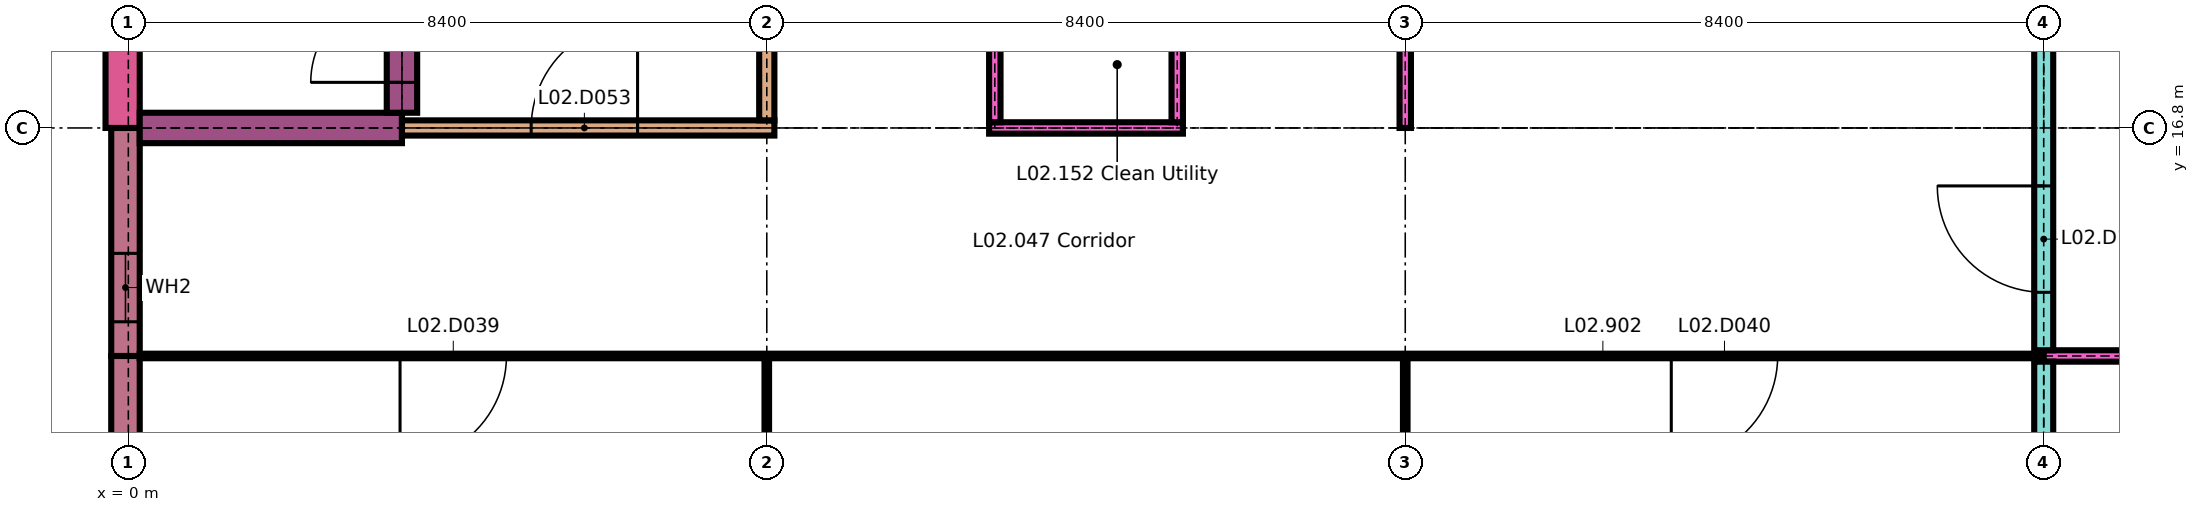
"""IFC4 building model, lengths in metres.
Left out: names, types, materials, properties, quantities, classifications, styles, units other than length and angle.
Written with IfcOpenShell. Run it as: python <this file> out.ifc"""

import sys

from ifc_helpers import new_model, si_unit, direction, frame, frame_2d, origin, place, context, subcontext, project, spatial, rectangle, extrude, element, fill, save


model = new_model("IFC4")
c1 = context("Model", 3, precision=1e-05, world=origin(), true_north=direction((0.0, 1.0)))
c2 = subcontext(c1, "Body", "Model", "MODEL_VIEW")
j1 = project(units=[si_unit("LENGTHUNIT", "METRE"), si_unit("PLANEANGLEUNIT", "RADIAN")], contexts=[c1])
p1 = place(None, origin())
s1 = spatial("IfcSite", under=j1, at=p1, CompositionType="ELEMENT")
p2 = place(p1, origin())
s2 = spatial("IfcBuilding", under=s1, at=p2, CompositionType="ELEMENT")
p3 = place(p2, frame((0.0, 0.0, 8.4)))
s3 = spatial("IfcBuildingStorey", under=s2, at=p3, CompositionType="ELEMENT", Elevation=8.4)
p4 = place(p3, frame((-0.038, 8.825, 0.0), z_axis=(0.0, 0.0, 1.0), x_axis=(0.0, 1.0, 0.0)))
e1 = element("IfcWall", 1, at=p4, inside=s3, PredefinedType="SOLIDWALL", context=c2, shape_type="SweptSolid", body=[
    extrude(rectangle(XDim=4.975, YDim=0.375, at=frame_2d((2.488, 0.0))), origin(), (0.0, 0.0, 1.0), 3.9),
])
p5 = place(p3, frame((-0.038, 13.8, 0.0), z_axis=(0.0, 0.0, 1.0), x_axis=(0.0, 1.0, 0.0)))
e2 = element("IfcWall", 2, at=p5, inside=s3, PredefinedType="SOLIDWALL", context=c2, shape_type="SweptSolid", body=[
    extrude(rectangle(XDim=3.0, YDim=0.375, at=frame_2d((1.5, 0.0))), origin(), (0.0, 0.0, 1.0), 3.9),
])
p6 = place(p5, frame((0.45, 0.0, 0.9)))
e3 = element("IfcOpeningElement", 3, at=p6, cuts=e2, PredefinedType="OPENING", context=c2, shape_type="SweptSolid", body=[
    extrude(rectangle(XDim=0.9, YDim=2.1, at=frame_2d((0.45, 1.05))), frame((0.0, 0.198, 0.0), z_axis=(0.0, -1.0, 0.0), x_axis=(1.0, 0.0, 0.0)), (0.0, 0.0, 1.0), 0.395),
])
p7 = place(p3, frame((-0.075, 16.8, 0.0), z_axis=(0.0, 0.0, 1.0), x_axis=(0.0, 1.0, 0.0)))
e4 = element("IfcWall", 4, at=p7, inside=s3, PredefinedType="SOLIDWALL", context=c2, shape_type="SweptSolid", body=[
    extrude(rectangle(XDim=3.15, YDim=0.45, at=frame_2d((1.575, 0.0))), origin(), (0.0, 0.0, 1.0), 4.2),
])
p8 = place(p3, frame((0.15, 13.8, 0.0), z_axis=(0.0, 0.0, 1.0), x_axis=(1.0, 0.0, 0.0)))
e5 = element("IfcWall", 5, at=p8, inside=s3, PredefinedType="PARTITIONING", context=c2, shape_type="SweptSolid", body=[
    extrude(rectangle(XDim=25.05, YDim=0.06, at=frame_2d((12.525, 0.0))), origin(), (0.0, 0.0, 1.0), 4.2),
])
p9 = place(p8, frame((3.425, 0.0, 0.0)))
e6 = element("IfcOpeningElement", 6, at=p9, cuts=e5, PredefinedType="OPENING", context=c2, shape_type="SweptSolid", body=[
    extrude(rectangle(XDim=1.4, YDim=2.1, at=frame_2d((0.7, 1.05))), frame((0.0, 0.04, 0.0), z_axis=(0.0, -1.0, 0.0), x_axis=(1.0, 0.0, 0.0)), (0.0, 0.0, 1.0), 0.08),
])
p10 = place(p8, frame((20.15, 0.0, 0.0)))
e7 = element("IfcOpeningElement", 7, at=p10, cuts=e5, PredefinedType="OPENING", context=c2, shape_type="SweptSolid", body=[
    extrude(rectangle(XDim=1.4, YDim=2.1, at=frame_2d((0.7, 1.05))), frame((0.0, 0.04, 0.0), z_axis=(0.0, -1.0, 0.0), x_axis=(1.0, 0.0, 0.0)), (0.0, 0.0, 1.0), 0.08),
])
p11 = place(p8, frame((18.65, 0.0, 0.9)))
e8 = element("IfcOpeningElement", 8, at=p11, cuts=e5, PredefinedType="OPENING", context=c2, shape_type="SweptSolid", body=[
    extrude(rectangle(XDim=1.2, YDim=0.9, at=frame_2d((0.6, 0.45))), frame((0.0, 0.04, 0.0), z_axis=(0.0, -1.0, 0.0), x_axis=(1.0, 0.0, 0.0)), (0.0, 0.0, 1.0), 0.08),
])
p12 = place(p3, frame((25.2, 13.8, 0.0), z_axis=(0.0, 0.0, 1.0), x_axis=(1.0, 0.0, 0.0)))
e9 = element("IfcWall", 9, at=p12, inside=s3, PredefinedType="PARTITIONING", context=c2, shape_type="SweptSolid", body=[
    extrude(rectangle(XDim=8.475, YDim=0.15, at=frame_2d((4.238, 0.0))), origin(), (0.0, 0.0, 1.0), 4.2),
])
p13 = place(p12, frame((1.5, 0.0, 0.0)))
e10 = element("IfcOpeningElement", 10, at=p13, cuts=e9, PredefinedType="OPENING", context=c2, shape_type="SweptSolid", body=[
    extrude(rectangle(XDim=2.0, YDim=2.4, at=frame_2d((1.0, 1.2))), frame((0.0, 0.085, 0.0), z_axis=(0.0, -1.0, 0.0), x_axis=(1.0, 0.0, 0.0)), (0.0, 0.0, 1.0), 0.17),
])
p14 = place(p12, frame((6.0, 0.0, 0.0)))
e11 = element("IfcOpeningElement", 11, at=p14, cuts=e9, PredefinedType="OPENING", context=c2, shape_type="SweptSolid", body=[
    extrude(rectangle(XDim=1.4, YDim=2.1, at=frame_2d((0.7, 1.05))), frame((0.0, 0.085, 0.0), z_axis=(0.0, -1.0, 0.0), x_axis=(1.0, 0.0, 0.0)), (0.0, 0.0, 1.0), 0.17),
])
p15 = place(p3, frame((0.15, 16.8, 0.0), z_axis=(0.0, 0.0, 1.0), x_axis=(1.0, 0.0, 0.0)))
e12 = element("IfcWall", 12, at=p15, inside=s3, PredefinedType="SHEAR", context=c2, shape_type="SweptSolid", body=[
    extrude(rectangle(XDim=3.45, YDim=0.4, at=frame_2d((1.725, 0.0))), origin(), (0.0, 0.0, 1.0), 4.2),
])
p16 = place(p3, frame((3.6, 16.8, 0.0), z_axis=(0.0, 0.0, 1.0), x_axis=(1.0, 0.0, 0.0)))
e13 = element("IfcWall", 13, at=p16, inside=s3, PredefinedType="PARTITIONING", context=c2, shape_type="SweptSolid", body=[
    extrude(rectangle(XDim=4.9, YDim=0.2, at=frame_2d((2.45, 0.0))), origin(), (0.0, 0.0, 1.0), 4.2),
])
p17 = place(p16, frame((1.7, 0.0, 0.0)))
e14 = element("IfcOpeningElement", 14, at=p17, cuts=e13, PredefinedType="OPENING", context=c2, shape_type="SweptSolid", body=[
    extrude(rectangle(XDim=1.4, YDim=2.1, at=frame_2d((0.7, 1.05))), frame((0.0, 0.11, 0.0), z_axis=(0.0, -1.0, 0.0), x_axis=(1.0, 0.0, 0.0)), (0.0, 0.0, 1.0), 0.22),
])
p18 = place(p3, frame((11.325, 16.8, 0.0), z_axis=(0.0, 0.0, 1.0), x_axis=(1.0, 0.0, 0.0)))
e15 = element("IfcWall", 15, at=p18, inside=s3, PredefinedType="PARTITIONING", context=c2, shape_type="SweptSolid", body=[
    extrude(rectangle(XDim=2.55, YDim=0.15, at=frame_2d((1.275, 0.0))), origin(), (0.0, 0.0, 1.0), 4.2),
])
p19 = place(p3, frame((3.6, 17.0, 0.0), z_axis=(0.0, 0.0, 1.0), x_axis=(0.0, 1.0, 0.0)))
e16 = element("IfcWall", 16, at=p19, inside=s3, PredefinedType="SHEAR", context=c2, shape_type="SweptSolid", body=[
    extrude(rectangle(XDim=8.0, YDim=0.4, at=frame_2d((4.0, 0.0))), origin(), (0.0, 0.0, 1.0), 4.2),
])
p20 = place(p19, frame((0.4, 0.0, 0.0)))
e17 = element("IfcOpeningElement", 17, at=p20, cuts=e16, PredefinedType="OPENING", context=c2, shape_type="SweptSolid", body=[
    extrude(rectangle(XDim=1.2, YDim=2.1, at=frame_2d((0.6, 1.05))), frame((0.0, 0.21, 0.0), z_axis=(0.0, -1.0, 0.0), x_axis=(1.0, 0.0, 0.0)), (0.0, 0.0, 1.0), 0.42),
])
p21 = place(p3, frame((8.4, 8.825, 0.0), z_axis=(0.0, 0.0, 1.0), x_axis=(0.0, 1.0, 0.0)))
e18 = element("IfcWall", 18, at=p21, inside=s3, PredefinedType="PARTITIONING", context=c2, shape_type="SweptSolid", body=[
    extrude(rectangle(XDim=4.945, YDim=0.06, at=frame_2d((2.473, 0.0))), origin(), (0.0, 0.0, 1.0), 4.2),
])
p22 = place(p3, frame((8.4, 16.9, 0.0), z_axis=(0.0, 0.0, 1.0), x_axis=(0.0, 1.0, 0.0)))
e19 = element("IfcWall", 19, at=p22, inside=s3, PredefinedType="PARTITIONING", context=c2, shape_type="SweptSolid", body=[
    extrude(rectangle(XDim=8.3, YDim=0.2, at=frame_2d((4.15, 0.0))), origin(), (0.0, 0.0, 1.0), 4.2),
])
p23 = place(p3, frame((11.4, 16.875, 0.0), z_axis=(0.0, 0.0, 1.0), x_axis=(0.0, 1.0, 0.0)))
e20 = element("IfcWall", 20, at=p23, inside=s3, PredefinedType="PARTITIONING", context=c2, shape_type="SweptSolid", body=[
    extrude(rectangle(XDim=11.25, YDim=0.15, at=frame_2d((5.625, 0.0))), origin(), (0.0, 0.0, 1.0), 4.2),
])
p24 = place(p23, frame((1.312, 0.0, 0.0)))
e21 = element("IfcOpeningElement", 21, at=p24, cuts=e20, PredefinedType="OPENING", context=c2, shape_type="SweptSolid", body=[
    extrude(rectangle(XDim=1.1, YDim=2.1, at=frame_2d((0.55, 1.05))), frame((0.0, 0.085, 0.0), z_axis=(0.0, -1.0, 0.0), x_axis=(1.0, 0.0, 0.0)), (0.0, 0.0, 1.0), 0.17),
])
p25 = place(p23, frame((8.887, 0.0, 0.0)))
e22 = element("IfcOpeningElement", 22, at=p25, cuts=e20, PredefinedType="OPENING", context=c2, shape_type="SweptSolid", body=[
    extrude(rectangle(XDim=1.0, YDim=2.1, at=frame_2d((0.5, 1.05))), frame((0.0, 0.085, 0.0), z_axis=(0.0, -1.0, 0.0), x_axis=(1.0, 0.0, 0.0)), (0.0, 0.0, 1.0), 0.17),
])
p26 = place(p3, frame((13.8, 16.875, 0.0), z_axis=(0.0, 0.0, 1.0), x_axis=(0.0, 1.0, 0.0)))
e23 = element("IfcWall", 23, at=p26, inside=s3, PredefinedType="PARTITIONING", context=c2, shape_type="SweptSolid", body=[
    extrude(rectangle(XDim=11.25, YDim=0.15, at=frame_2d((5.625, 0.0))), origin(), (0.0, 0.0, 1.0), 4.2),
])
p27 = place(p26, frame((5.075, 0.0, 0.0)))
e24 = element("IfcOpeningElement", 24, at=p27, cuts=e23, PredefinedType="OPENING", context=c2, shape_type="SweptSolid", body=[
    extrude(rectangle(XDim=1.1, YDim=2.1, at=frame_2d((0.55, 1.05))), frame((0.0, 0.085, 0.0), z_axis=(0.0, -1.0, 0.0), x_axis=(1.0, 0.0, 0.0)), (0.0, 0.0, 1.0), 0.17),
])
p28 = place(p3, frame((16.8, 8.825, 0.0), z_axis=(0.0, 0.0, 1.0), x_axis=(0.0, 1.0, 0.0)))
e25 = element("IfcWall", 25, at=p28, inside=s3, PredefinedType="PARTITIONING", context=c2, shape_type="SweptSolid", body=[
    extrude(rectangle(XDim=4.945, YDim=0.06, at=frame_2d((2.473, 0.0))), origin(), (0.0, 0.0, 1.0), 4.2),
])
p29 = place(p28, frame((1.772, 0.0, 0.0)))
e26 = element("IfcOpeningElement", 26, at=p29, cuts=e25, PredefinedType="OPENING", context=c2, shape_type="SweptSolid", body=[
    extrude(rectangle(XDim=1.4, YDim=2.1, at=frame_2d((0.7, 1.05))), frame((0.0, 0.04, 0.0), z_axis=(0.0, -1.0, 0.0), x_axis=(1.0, 0.0, 0.0)), (0.0, 0.0, 1.0), 0.08),
])
p30 = place(p3, frame((16.8, 16.8, 0.0), z_axis=(0.0, 0.0, 1.0), x_axis=(0.0, 1.0, 0.0)))
e27 = element("IfcWall", 27, at=p30, inside=s3, PredefinedType="PARTITIONING", context=c2, shape_type="SweptSolid", body=[
    extrude(rectangle(XDim=4.8, YDim=0.15, at=frame_2d((2.4, 0.0))), origin(), (0.0, 0.0, 1.0), 4.2),
])
p31 = place(p3, frame((25.2, 8.825, 0.0), z_axis=(0.0, 0.0, 1.0), x_axis=(0.0, 1.0, 0.0)))
e28 = element("IfcWall", 28, at=p31, inside=s3, PredefinedType="SOLIDWALL", context=c2, shape_type="SweptSolid", body=[
    extrude(rectangle(XDim=4.9, YDim=0.25, at=frame_2d((2.45, 0.0))), origin(), (0.0, 0.0, 1.0), 4.2),
])
p32 = place(p3, frame((25.2, 13.875, 0.0), z_axis=(0.0, 0.0, 1.0), x_axis=(0.0, 1.0, 0.0)))
e29 = element("IfcWall", 29, at=p32, inside=s3, PredefinedType="SOLIDWALL", context=c2, shape_type="SweptSolid", body=[
    extrude(rectangle(XDim=7.725, YDim=0.25, at=frame_2d((3.863, 0.0))), origin(), (0.0, 0.0, 1.0), 4.2),
])
p33 = place(p32, frame((0.762, 0.0, 0.0)))
e30 = element("IfcOpeningElement", 30, at=p33, cuts=e29, PredefinedType="OPENING", context=c2, shape_type="SweptSolid", body=[
    extrude(rectangle(XDim=1.4, YDim=2.1, at=frame_2d((0.7, 1.05))), frame((0.0, 0.135, 0.0), z_axis=(0.0, -1.0, 0.0), x_axis=(1.0, 0.0, 0.0)), (0.0, 0.0, 1.0), 0.27),
])
p34 = place(p6, origin())
e31 = element("IfcWindow", 31, at=p34, inside=s3, PartitioningType="SINGLE_PANEL", PredefinedType="WINDOW", context=c2, shape_type="SweptSolid", body=[
    extrude(rectangle(XDim=0.9, YDim=2.1, at=frame_2d((0.45, 1.05))), frame((0.0, 0.03, 0.0), z_axis=(0.0, -1.0, 0.0), x_axis=(1.0, 0.0, 0.0)), (0.0, 0.0, 1.0), 0.06),
])
fill(e3, e31)
p35 = place(p9, origin())
e32 = element("IfcDoor", 32, at=p35, inside=s3, OperationType="SINGLE_SWING_LEFT", PredefinedType="DOOR", context=c2, shape_type="SweptSolid", body=[
    extrude(rectangle(XDim=1.4, YDim=2.1, at=frame_2d((0.7, 1.05))), frame((0.0, 0.025, 0.0), z_axis=(0.0, -1.0, 0.0), x_axis=(1.0, 0.0, 0.0)), (0.0, 0.0, 1.0), 0.05),
])
fill(e6, e32)
p36 = place(p10, origin())
e33 = element("IfcDoor", 33, at=p36, inside=s3, OperationType="SINGLE_SWING_LEFT", PredefinedType="DOOR", context=c2, shape_type="SweptSolid", body=[
    extrude(rectangle(XDim=1.4, YDim=2.1, at=frame_2d((0.7, 1.05))), frame((0.0, 0.025, 0.0), z_axis=(0.0, -1.0, 0.0), x_axis=(1.0, 0.0, 0.0)), (0.0, 0.0, 1.0), 0.05),
])
fill(e7, e33)
p37 = place(p17, origin())
e34 = element("IfcDoor", 34, at=p37, inside=s3, OperationType="SINGLE_SWING_LEFT", PredefinedType="DOOR", context=c2, shape_type="SweptSolid", body=[
    extrude(rectangle(XDim=1.4, YDim=2.1, at=frame_2d((0.7, 1.05))), frame((0.0, 0.03, 0.0), z_axis=(0.0, -1.0, 0.0), x_axis=(1.0, 0.0, 0.0)), (0.0, 0.0, 1.0), 0.06),
])
fill(e14, e34)
p38 = place(p20, origin())
e35 = element("IfcDoor", 35, at=p38, inside=s3, OperationType="SINGLE_SWING_RIGHT", PredefinedType="DOOR", context=c2, shape_type="SweptSolid", body=[
    extrude(rectangle(XDim=1.2, YDim=2.1, at=frame_2d((0.6, 1.05))), frame((0.0, 0.025, 0.0), z_axis=(0.0, -1.0, 0.0), x_axis=(1.0, 0.0, 0.0)), (0.0, 0.0, 1.0), 0.05),
])
fill(e17, e35)
p39 = place(p33, origin())
e36 = element("IfcDoor", 36, at=p39, inside=s3, OperationType="SINGLE_SWING_LEFT", PredefinedType="DOOR", context=c2, shape_type="SweptSolid", body=[
    extrude(rectangle(XDim=1.4, YDim=2.1, at=frame_2d((0.7, 1.05))), frame((0.0, 0.03, 0.0), z_axis=(0.0, -1.0, 0.0), x_axis=(1.0, 0.0, 0.0)), (0.0, 0.0, 1.0), 0.06),
])
fill(e30, e36)
p40 = place(p11, origin())
e37 = element("IfcWindow", 37, at=p40, inside=s3, PartitioningType="DOUBLE_PANEL_VERTICAL", PredefinedType="WINDOW", context=c2, shape_type="SweptSolid", body=[
    extrude(rectangle(XDim=1.2, YDim=0.9, at=frame_2d((0.6, 0.45))), frame((0.0, 0.03, 0.0), z_axis=(0.0, -1.0, 0.0), x_axis=(1.0, 0.0, 0.0)), (0.0, 0.0, 1.0), 0.06),
])
fill(e8, e37)
save(model, sys.argv[1])
